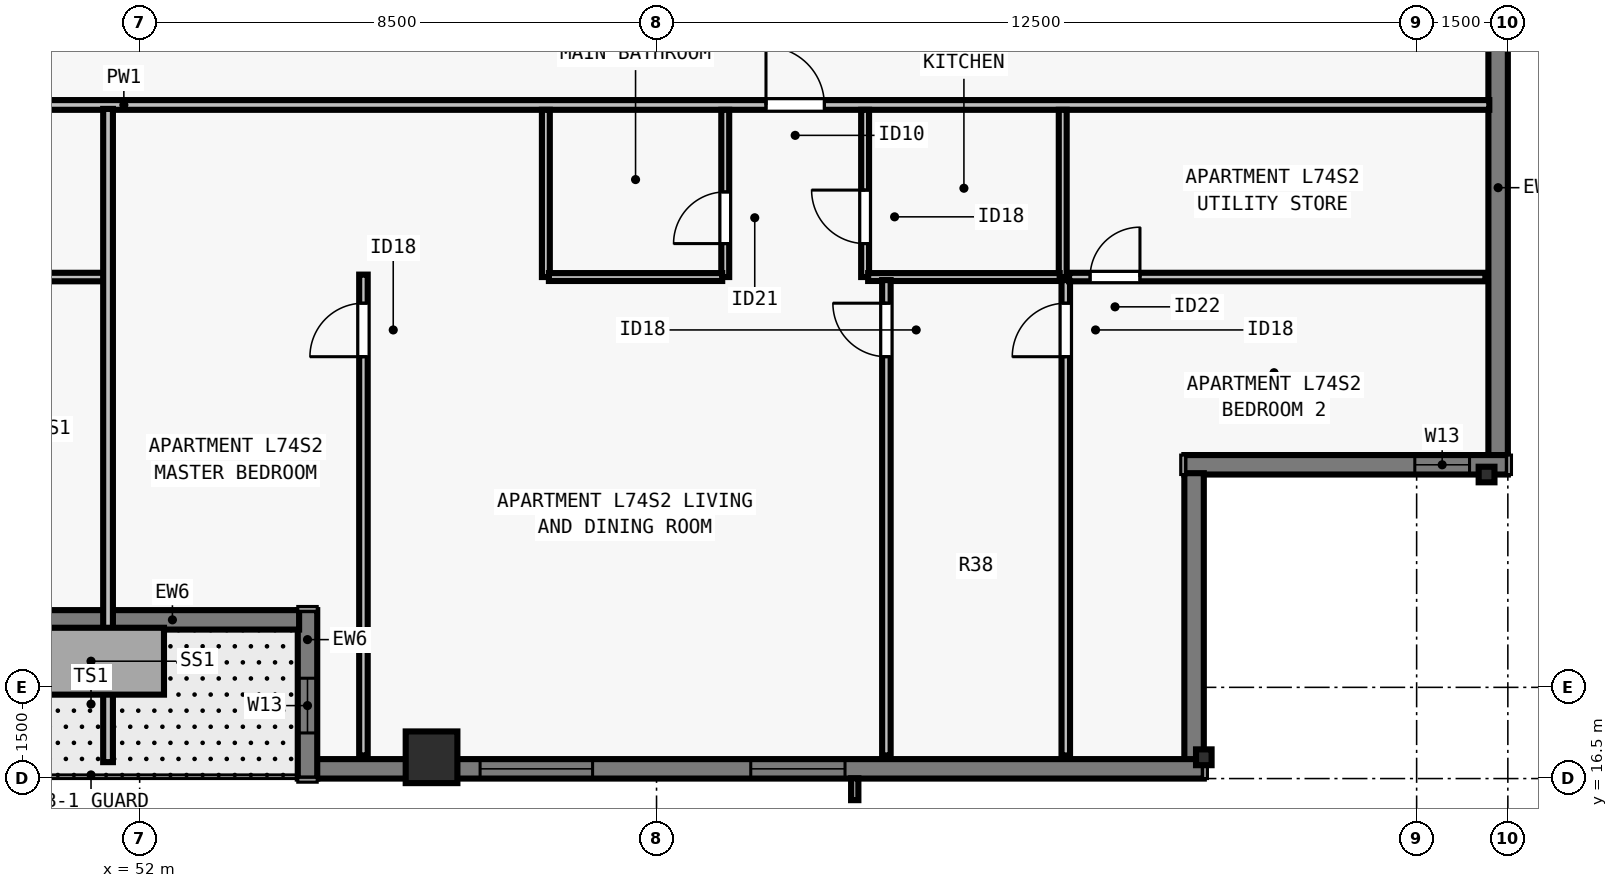
"""IFC4 building model, lengths in metres.
Left out: names, types, materials, properties, quantities, classifications, styles, units other than length and angle.
Written with IfcOpenShell. Run it as: python <this file> out.ifc"""

import sys

from ifc_helpers import new_model, si_unit, direction, frame, frame_2d, origin, origin_2d, place, context, subcontext, project, spatial, rectangle, i_section, extrude, element, fill, save


model = new_model("IFC4")
c1 = context("Model", 3, precision=1e-05, world=origin(), true_north=direction((0.0, 1.0)))
c2 = subcontext(c1, "Body", "Model", "MODEL_VIEW")
j1 = project(units=[si_unit("LENGTHUNIT", "METRE"), si_unit("PLANEANGLEUNIT", "RADIAN")], contexts=[c1])
p1 = place(None, origin())
s1 = spatial("IfcSite", under=j1, at=p1, CompositionType="ELEMENT")
p2 = place(p1, origin())
s2 = spatial("IfcBuilding", under=s1, at=p2, CompositionType="ELEMENT")
p3 = place(p2, frame((0.0, 0.0, 269.0)))
s3 = spatial("IfcBuildingStorey", under=s2, at=p3, CompositionType="ELEMENT", Elevation=269.0)
p4 = place(p3, frame((56.8, 16.85, 0.0), z_axis=(0.0, 0.0, 1.0), x_axis=(1.0, 0.0, 0.0)))
e1 = element("IfcColumn", 1, at=p4, inside=s3, PredefinedType="COLUMN", context=c2, shape_type="SweptSolid", body=[
    extrude(rectangle(XDim=0.85, YDim=0.85, at=origin_2d()), origin(), (0.0, 0.0, 1.0), 3.5),
])
for number, where, z_axis, x_axis in (
    (2, (69.5, 16.85, 0.0), (0.0, 0.0, 1.0), (1.0, 0.0, 0.0)),
    (3, (74.15, 21.5, 0.0), (0.0, 0.0, 1.0), (0.0, 1.0, 0.0)),
):
    element("IfcColumn", number, at=place(p3, frame(where, z_axis=z_axis, x_axis=x_axis)), inside=s3, PredefinedType="COLUMN", context=c2, shape_type="SweptSolid", body=[
        extrude(i_section(OverallWidth=0.256, OverallDepth=0.26, WebThickness=0.01, FlangeThickness=0.017, FilletRadius=0.013, at=origin_2d()), origin(), (0.0, 0.0, 1.0), 3.5),
    ])
p5 = place(p3, frame((74.34, 56.5, 0.0), z_axis=(0.0, 0.0, 1.0), x_axis=(0.0, -1.0, 0.0)))
e4 = element("IfcWall", 4, at=p5, inside=s3, PredefinedType="SOLIDWALL", context=c2, shape_type="SweptSolid", body=[
    extrude(rectangle(XDim=34.702, YDim=0.32, at=frame_2d((17.351, 0.0))), origin(), (0.0, 0.0, 1.0), 3.29),
])
p6 = place(p5, frame((6.738, 0.0, 0.8)))
e5 = element("IfcOpeningElement", 5, at=p6, cuts=e4, PredefinedType="OPENING", context=c2, shape_type="SweptSolid", body=[
    extrude(rectangle(XDim=1.85, YDim=1.678, at=frame_2d((0.925, 0.839))), frame((0.0, 0.17, 0.0), z_axis=(0.0, -1.0, 0.0), x_axis=(1.0, 0.0, 0.0)), (0.0, 0.0, 1.0), 0.34),
])
p7 = place(p5, frame((10.263, 0.0, 0.8)))
e6 = element("IfcOpeningElement", 6, at=p7, cuts=e4, PredefinedType="OPENING", context=c2, shape_type="SweptSolid", body=[
    extrude(rectangle(XDim=1.55, YDim=1.678, at=frame_2d((0.775, 0.839))), frame((0.0, 0.17, 0.0), z_axis=(0.0, -1.0, 0.0), x_axis=(1.0, 0.0, 0.0)), (0.0, 0.0, 1.0), 0.34),
])
p8 = place(p5, frame((13.488, 0.0, 0.8)))
e7 = element("IfcOpeningElement", 7, at=p8, cuts=e4, PredefinedType="OPENING", context=c2, shape_type="SweptSolid", body=[
    extrude(rectangle(XDim=1.85, YDim=1.678, at=frame_2d((0.925, 0.839))), frame((0.0, 0.17, 0.0), z_axis=(0.0, -1.0, 0.0), x_axis=(1.0, 0.0, 0.0)), (0.0, 0.0, 1.0), 0.34),
])
p9 = place(p5, frame((18.264, 0.0, 0.8)))
e8 = element("IfcOpeningElement", 8, at=p9, cuts=e4, PredefinedType="OPENING", context=c2, shape_type="SweptSolid", body=[
    extrude(rectangle(XDim=1.55, YDim=1.678, at=frame_2d((0.775, 0.839))), frame((0.0, 0.17, 0.0), z_axis=(0.0, -1.0, 0.0), x_axis=(1.0, 0.0, 0.0)), (0.0, 0.0, 1.0), 0.34),
])
p10 = place(p5, frame((24.164, 0.0, 0.8)))
e9 = element("IfcOpeningElement", 9, at=p10, cuts=e4, PredefinedType="OPENING", context=c2, shape_type="SweptSolid", body=[
    extrude(rectangle(XDim=1.55, YDim=1.678, at=frame_2d((0.775, 0.839))), frame((0.0, 0.17, 0.0), z_axis=(0.0, -1.0, 0.0), x_axis=(1.0, 0.0, 0.0)), (0.0, 0.0, 1.0), 0.34),
])
p11 = place(p3, frame((74.5, 21.66, 0.0), z_axis=(0.0, 0.0, 1.0), x_axis=(-1.0, 0.0, 0.0)))
e10 = element("IfcWall", 10, at=p11, inside=s3, PredefinedType="SOLIDWALL", context=c2, shape_type="SweptSolid", body=[
    extrude(rectangle(XDim=5.32, YDim=0.32, at=frame_2d((2.66, 0.0))), origin(), (0.0, 0.0, 1.0), 3.29),
])
p12 = place(p11, frame((0.63, 0.0, 0.8)))
e11 = element("IfcOpeningElement", 11, at=p12, cuts=e10, PredefinedType="OPENING", context=c2, shape_type="SweptSolid", body=[
    extrude(rectangle(XDim=0.9, YDim=1.678, at=frame_2d((0.45, 0.839))), frame((0.0, 0.17, 0.0), z_axis=(0.0, -1.0, 0.0), x_axis=(1.0, 0.0, 0.0)), (0.0, 0.0, 1.0), 0.34),
])
p13 = place(p3, frame((69.34, 21.522, 0.0), z_axis=(0.0, 0.0, 1.0), x_axis=(0.0, -1.0, 0.0)))
e12 = element("IfcWall", 12, at=p13, inside=s3, PredefinedType="SOLIDWALL", context=c2, shape_type="SweptSolid", body=[
    extrude(rectangle(XDim=4.724, YDim=0.32, at=frame_2d((2.362, 0.0))), origin(), (0.0, 0.0, 1.0), 3.29),
])
p14 = place(p3, frame((69.5, 16.66, 0.0), z_axis=(0.0, 0.0, 1.0), x_axis=(-1.0, 0.0, 0.0)))
e13 = element("IfcWall", 13, at=p14, inside=s3, PredefinedType="SOLIDWALL", context=c2, shape_type="SweptSolid", body=[
    extrude(rectangle(XDim=14.602, YDim=0.32, at=frame_2d((7.301, 0.0))), origin(), (0.0, 0.0, 1.0), 3.29),
])
p15 = place(p14, frame((5.9, 0.0, 0.8)))
e14 = element("IfcOpeningElement", 14, at=p15, cuts=e13, PredefinedType="OPENING", context=c2, shape_type="SweptSolid", body=[
    extrude(rectangle(XDim=1.55, YDim=1.678, at=frame_2d((0.775, 0.839))), frame((0.0, 0.17, 0.0), z_axis=(0.0, -1.0, 0.0), x_axis=(1.0, 0.0, 0.0)), (0.0, 0.0, 1.0), 0.34),
])
p16 = place(p14, frame((10.052, 0.0, 0.8)))
e15 = element("IfcOpeningElement", 15, at=p16, cuts=e13, PredefinedType="OPENING", context=c2, shape_type="SweptSolid", body=[
    extrude(rectangle(XDim=1.85, YDim=1.678, at=frame_2d((0.925, 0.839))), frame((0.0, 0.17, 0.0), z_axis=(0.0, -1.0, 0.0), x_axis=(1.0, 0.0, 0.0)), (0.0, 0.0, 1.0), 0.34),
])
p17 = place(p3, frame((54.76, 16.5, 0.0), z_axis=(0.0, 0.0, 1.0), x_axis=(0.0, 1.0, 0.0)))
e16 = element("IfcWall", 16, at=p17, inside=s3, PredefinedType="SOLIDWALL", context=c2, shape_type="SweptSolid", body=[
    extrude(rectangle(XDim=2.77, YDim=0.32, at=frame_2d((1.385, 0.0))), origin(), (0.0, 0.0, 1.0), 3.29),
])
p18 = place(p17, frame((0.75, 0.0, 0.8)))
e17 = element("IfcOpeningElement", 17, at=p18, cuts=e16, PredefinedType="OPENING", context=c2, shape_type="SweptSolid", body=[
    extrude(rectangle(XDim=0.9, YDim=1.678, at=frame_2d((0.45, 0.839))), frame((0.0, 0.17, 0.0), z_axis=(0.0, -1.0, 0.0), x_axis=(1.0, 0.0, 0.0)), (0.0, 0.0, 1.0), 0.34),
])
p19 = place(p3, frame((54.622, 19.11, 0.0), z_axis=(0.0, 0.0, 1.0), x_axis=(-1.0, 0.0, 0.0)))
e18 = element("IfcWall", 18, at=p19, inside=s3, PredefinedType="SOLIDWALL", context=c2, shape_type="SweptSolid", body=[
    extrude(rectangle(XDim=7.142, YDim=0.32, at=frame_2d((3.571, 0.0))), origin(), (0.0, 0.0, 1.0), 3.29),
])
p20 = place(p19, frame((4.317, 0.0, 0.0)))
e19 = element("IfcOpeningElement", 19, at=p20, cuts=e18, PredefinedType="OPENING", context=c2, shape_type="SweptSolid", body=[
    extrude(rectangle(XDim=1.0, YDim=2.15, at=frame_2d((0.5, 1.075))), frame((0.0, 0.17, 0.0), z_axis=(0.0, -1.0, 0.0), x_axis=(1.0, 0.0, 0.0)), (0.0, 0.0, 1.0), 0.34),
])
p21 = place(p3, frame((29.805, 27.577, 0.0), z_axis=(0.0, 0.0, 1.0), x_axis=(1.0, 0.0, 0.0)))
e20 = element("IfcWall", 20, at=p21, inside=s3, PredefinedType="PARTITIONING", context=c2, shape_type="SweptSolid", body=[
    extrude(rectangle(XDim=44.39, YDim=0.16, at=frame_2d((22.195, 0.0))), origin(), (0.0, 0.0, 1.0), 2.958),
])
p22 = place(p21, frame((10.415, 0.0, 0.0)))
e21 = element("IfcOpeningElement", 21, at=p22, cuts=e20, PredefinedType="OPENING", context=c2, shape_type="SweptSolid", body=[
    extrude(rectangle(XDim=0.96, YDim=2.18, at=frame_2d((0.48, 1.09))), frame((0.0, 0.09, 0.0), z_axis=(0.0, -1.0, 0.0), x_axis=(1.0, 0.0, 0.0)), (0.0, 0.0, 1.0), 0.18),
])
p23 = place(p21, frame((32.495, 0.0, 0.0)))
e22 = element("IfcOpeningElement", 22, at=p23, cuts=e20, PredefinedType="OPENING", context=c2, shape_type="SweptSolid", body=[
    extrude(rectangle(XDim=0.96, YDim=2.18, at=frame_2d((0.48, 1.09))), frame((0.0, 0.09, 0.0), z_axis=(0.0, -1.0, 0.0), x_axis=(1.0, 0.0, 0.0)), (0.0, 0.0, 1.0), 0.18),
])
p24 = place(p3, frame((45.15, 24.748, 0.0), z_axis=(0.0, 0.0, 1.0), x_axis=(1.0, 0.0, 0.0)))
e23 = element("IfcWall", 23, at=p24, inside=s3, PredefinedType="PARTITIONING", context=c2, shape_type="SweptSolid", body=[
    extrude(rectangle(XDim=6.38, YDim=0.14, at=frame_2d((3.19, 0.0))), origin(), (0.0, 0.0, 1.0), 3.29),
])
p25 = place(p24, frame((0.4, 0.0, 0.0)))
e24 = element("IfcOpeningElement", 24, at=p25, cuts=e23, PredefinedType="OPENING", context=c2, shape_type="SweptSolid", body=[
    extrude(rectangle(XDim=0.82, YDim=2.1, at=frame_2d((0.41, 1.05))), frame((0.0, 0.08, 0.0), z_axis=(0.0, -1.0, 0.0), x_axis=(1.0, 0.0, 0.0)), (0.0, 0.0, 1.0), 0.16),
])
p26 = place(p3, frame((51.48, 16.77, 0.0), z_axis=(0.0, 0.0, 1.0), x_axis=(0.0, 1.0, 0.0)))
e25 = element("IfcWall", 25, at=p26, inside=s3, PredefinedType="PARTITIONING", context=c2, shape_type="SweptSolid", body=[
    extrude(rectangle(XDim=10.742, YDim=0.16, at=frame_2d((5.371, 0.0))), origin(), (0.0, 0.0, 1.0), 2.958),
])
p27 = place(p3, frame((58.68, 24.748, 0.0), z_axis=(0.0, 0.0, 1.0), x_axis=(0.0, 1.0, 0.0)))
e26 = element("IfcWall", 26, at=p27, inside=s3, PredefinedType="PLUMBINGWALL", context=c2, shape_type="SweptSolid", body=[
    extrude(rectangle(XDim=2.75, YDim=0.13, at=frame_2d((1.375, 0.0))), origin(), (0.0, 0.0, 1.0), 3.29),
])
p28 = place(p3, frame((61.63, 24.748, 0.0), z_axis=(0.0, 0.0, 1.0), x_axis=(0.0, 1.0, 0.0)))
e27 = element("IfcWall", 27, at=p28, inside=s3, PredefinedType="PLUMBINGWALL", context=c2, shape_type="SweptSolid", body=[
    extrude(rectangle(XDim=2.75, YDim=0.13, at=frame_2d((1.375, 0.0))), origin(), (0.0, 0.0, 1.0), 3.29),
])
p29 = place(p28, frame((0.55, 0.0, 0.0)))
e28 = element("IfcOpeningElement", 28, at=p29, cuts=e27, PredefinedType="OPENING", context=c2, shape_type="SweptSolid", body=[
    extrude(rectangle(XDim=0.85, YDim=2.08, at=frame_2d((0.425, 1.04))), frame((0.0, 0.075, 0.0), z_axis=(0.0, -1.0, 0.0), x_axis=(1.0, 0.0, 0.0)), (0.0, 0.0, 1.0), 0.15),
])
p30 = place(p3, frame((58.73, 24.748, 0.0), z_axis=(0.0, 0.0, 1.0), x_axis=(1.0, 0.0, 0.0)))
e29 = element("IfcWall", 29, at=p30, inside=s3, PredefinedType="PLUMBINGWALL", context=c2, shape_type="SweptSolid", body=[
    extrude(rectangle(XDim=2.85, YDim=0.13, at=frame_2d((1.425, 0.0))), origin(), (0.0, 0.0, 1.0), 3.29),
])
p31 = place(p3, frame((67.18, 24.748, 0.0), z_axis=(0.0, 0.0, 1.0), x_axis=(0.0, 1.0, 0.0)))
e30 = element("IfcWall", 30, at=p31, inside=s3, PredefinedType="PLUMBINGWALL", context=c2, shape_type="SweptSolid", body=[
    extrude(rectangle(XDim=2.75, YDim=0.13, at=frame_2d((1.375, 0.0))), origin(), (0.0, 0.0, 1.0), 3.29),
])
p32 = place(p3, frame((63.93, 24.748, 0.0), z_axis=(0.0, 0.0, 1.0), x_axis=(0.0, 1.0, 0.0)))
e31 = element("IfcWall", 31, at=p32, inside=s3, PredefinedType="PLUMBINGWALL", context=c2, shape_type="SweptSolid", body=[
    extrude(rectangle(XDim=2.75, YDim=0.13, at=frame_2d((1.375, 0.0))), origin(), (0.0, 0.0, 1.0), 2.573),
])
p33 = place(p32, frame((0.55, 0.0, 0.0)))
e32 = element("IfcOpeningElement", 32, at=p33, cuts=e31, PredefinedType="OPENING", context=c2, shape_type="SweptSolid", body=[
    extrude(rectangle(XDim=0.88, YDim=2.1, at=frame_2d((0.44, 1.05))), frame((0.0, 0.075, 0.0), z_axis=(0.0, -1.0, 0.0), x_axis=(1.0, 0.0, 0.0)), (0.0, 0.0, 1.0), 0.15),
])
p34 = place(p3, frame((63.98, 24.748, 0.0), z_axis=(0.0, 0.0, 1.0), x_axis=(1.0, 0.0, 0.0)))
e33 = element("IfcWall", 33, at=p34, inside=s3, PredefinedType="PLUMBINGWALL", context=c2, shape_type="SweptSolid", body=[
    extrude(rectangle(XDim=3.15, YDim=0.13, at=frame_2d((1.575, 0.0))), origin(), (0.0, 0.0, 1.0), 3.29),
])
p35 = place(p3, frame((55.68, 16.88, 0.0), z_axis=(0.0, 0.0, 1.0), x_axis=(0.0, 1.0, 0.0)))
e34 = element("IfcWall", 34, at=p35, inside=s3, PredefinedType="PARTITIONING", context=c2, shape_type="SweptSolid", body=[
    extrude(rectangle(XDim=7.908, YDim=0.14, at=frame_2d((3.954, 0.0))), origin(), (0.0, 0.0, 1.0), 3.29),
])
p36 = place(p35, frame((6.558, 0.0, 0.0)))
e35 = element("IfcOpeningElement", 35, at=p36, cuts=e34, PredefinedType="OPENING", context=c2, shape_type="SweptSolid", body=[
    extrude(rectangle(XDim=0.88, YDim=2.1, at=frame_2d((0.44, 1.05))), frame((0.0, 0.08, 0.0), z_axis=(0.0, -1.0, 0.0), x_axis=(1.0, 0.0, 0.0)), (0.0, 0.0, 1.0), 0.16),
])
p37 = place(p3, frame((67.23, 16.88, 0.0), z_axis=(0.0, 0.0, 1.0), x_axis=(0.0, 1.0, 0.0)))
e36 = element("IfcWall", 36, at=p37, inside=s3, PredefinedType="PARTITIONING", context=c2, shape_type="SweptSolid", body=[
    extrude(rectangle(XDim=7.818, YDim=0.14, at=frame_2d((3.909, 0.0))), origin(), (0.0, 0.0, 1.0), 2.573),
])
p38 = place(p37, frame((6.558, 0.0, 0.0)))
e37 = element("IfcOpeningElement", 37, at=p38, cuts=e36, PredefinedType="OPENING", context=c2, shape_type="SweptSolid", body=[
    extrude(rectangle(XDim=0.88, YDim=2.1, at=frame_2d((0.44, 1.05))), frame((0.0, 0.08, 0.0), z_axis=(0.0, -1.0, 0.0), x_axis=(1.0, 0.0, 0.0)), (0.0, 0.0, 1.0), 0.16),
])
p39 = place(p3, frame((67.285, 24.748, 0.0), z_axis=(0.0, 0.0, 1.0), x_axis=(1.0, 0.0, 0.0)))
e38 = element("IfcWall", 38, at=p39, inside=s3, PredefinedType="PARTITIONING", context=c2, shape_type="SweptSolid", body=[
    extrude(rectangle(XDim=6.845, YDim=0.14, at=frame_2d((3.422, 0.0))), origin(), (0.0, 0.0, 1.0), 2.958),
])
p40 = place(p39, frame((0.345, 0.0, 0.0)))
e39 = element("IfcOpeningElement", 39, at=p40, cuts=e38, PredefinedType="OPENING", context=c2, shape_type="SweptSolid", body=[
    extrude(rectangle(XDim=0.82, YDim=2.1, at=frame_2d((0.41, 1.05))), frame((0.0, 0.08, 0.0), z_axis=(0.0, -1.0, 0.0), x_axis=(1.0, 0.0, 0.0)), (0.0, 0.0, 1.0), 0.16),
])
p41 = place(p3, frame((64.28, 16.88, 0.0), z_axis=(0.0, 0.0, 1.0), x_axis=(0.0, 1.0, 0.0)))
e40 = element("IfcWall", 40, at=p41, inside=s3, PredefinedType="PARTITIONING", context=c2, shape_type="SweptSolid", body=[
    extrude(rectangle(XDim=7.818, YDim=0.14, at=frame_2d((3.909, 0.0))), origin(), (0.0, 0.0, 1.0), 2.573),
])
p42 = place(p41, frame((6.558, 0.0, 0.0)))
e41 = element("IfcOpeningElement", 41, at=p42, cuts=e40, PredefinedType="OPENING", context=c2, shape_type="SweptSolid", body=[
    extrude(rectangle(XDim=0.88, YDim=2.1, at=frame_2d((0.44, 1.05))), frame((0.0, 0.08, 0.0), z_axis=(0.0, -1.0, 0.0), x_axis=(1.0, 0.0, 0.0)), (0.0, 0.0, 1.0), 0.16),
])
p43 = place(p15, origin())
e42 = element("IfcWindow", 42, at=p43, inside=s3, PartitioningType="SINGLE_PANEL", PredefinedType="WINDOW", context=c2, shape_type="SweptSolid", body=[
    extrude(rectangle(XDim=1.55, YDim=1.678, at=frame_2d((0.775, 0.839))), frame((0.0, -0.05, 0.0), z_axis=(0.0, -1.0, 0.0), x_axis=(1.0, 0.0, 0.0)), (0.0, 0.0, 1.0), 0.06),
])
fill(e14, e42)
p44 = place(p16, origin())
e43 = element("IfcWindow", 43, at=p44, inside=s3, PartitioningType="SINGLE_PANEL", PredefinedType="WINDOW", context=c2, shape_type="SweptSolid", body=[
    extrude(rectangle(XDim=1.85, YDim=1.678, at=frame_2d((0.925, 0.839))), frame((0.0, -0.05, 0.0), z_axis=(0.0, -1.0, 0.0), x_axis=(1.0, 0.0, 0.0)), (0.0, 0.0, 1.0), 0.06),
])
fill(e15, e43)
p45 = place(p18, origin())
e44 = element("IfcWindow", 44, at=p45, inside=s3, PartitioningType="SINGLE_PANEL", PredefinedType="WINDOW", context=c2, shape_type="SweptSolid", body=[
    extrude(rectangle(XDim=0.9, YDim=1.678, at=frame_2d((0.45, 0.839))), frame((0.0, -0.04, 0.0), z_axis=(0.0, -1.0, 0.0), x_axis=(1.0, 0.0, 0.0)), (0.0, 0.0, 1.0), 0.06),
])
fill(e17, e44)
p46 = place(p12, origin())
e45 = element("IfcWindow", 45, at=p46, inside=s3, PartitioningType="SINGLE_PANEL", PredefinedType="WINDOW", context=c2, shape_type="SweptSolid", body=[
    extrude(rectangle(XDim=0.9, YDim=1.678, at=frame_2d((0.45, 0.839))), frame((0.0, -0.04, 0.0), z_axis=(0.0, -1.0, 0.0), x_axis=(1.0, 0.0, 0.0)), (0.0, 0.0, 1.0), 0.06),
])
fill(e11, e45)
p47 = place(p29, origin())
e46 = element("IfcDoor", 46, at=p47, inside=s3, OperationType="SINGLE_SWING_LEFT", PredefinedType="DOOR", context=c2, shape_type="SweptSolid", body=[
    extrude(rectangle(XDim=0.85, YDim=2.08, at=frame_2d((0.425, 1.04))), frame((0.0, 0.025, 0.0), z_axis=(0.0, -1.0, 0.0), x_axis=(1.0, 0.0, 0.0)), (0.0, 0.0, 1.0), 0.05),
])
fill(e28, e46)
p48 = place(p33, origin())
e47 = element("IfcDoor", 47, at=p48, inside=s3, OperationType="SINGLE_SWING_RIGHT", PredefinedType="DOOR", context=c2, shape_type="SweptSolid", body=[
    extrude(rectangle(XDim=0.88, YDim=2.1, at=frame_2d((0.44, 1.05))), frame((0.0, 0.025, 0.0), z_axis=(0.0, -1.0, 0.0), x_axis=(1.0, 0.0, 0.0)), (0.0, 0.0, 1.0), 0.05),
])
fill(e32, e47)
p49 = place(p36, origin())
e48 = element("IfcDoor", 48, at=p49, inside=s3, OperationType="SINGLE_SWING_LEFT", PredefinedType="DOOR", context=c2, shape_type="SweptSolid", body=[
    extrude(rectangle(XDim=0.88, YDim=2.1, at=frame_2d((0.44, 1.05))), frame((0.0, 0.025, 0.0), z_axis=(0.0, -1.0, 0.0), x_axis=(1.0, 0.0, 0.0)), (0.0, 0.0, 1.0), 0.05),
])
fill(e35, e48)
p50 = place(p40, origin())
e49 = element("IfcDoor", 49, at=p50, inside=s3, OperationType="SINGLE_SWING_RIGHT", PredefinedType="DOOR", context=c2, shape_type="SweptSolid", body=[
    extrude(rectangle(XDim=0.82, YDim=2.1, at=frame_2d((0.41, 1.05))), frame((0.0, 0.025, 0.0), z_axis=(0.0, -1.0, 0.0), x_axis=(1.0, 0.0, 0.0)), (0.0, 0.0, 1.0), 0.05),
])
fill(e39, e49)
p51 = place(p38, origin())
e50 = element("IfcDoor", 50, at=p51, inside=s3, OperationType="SINGLE_SWING_LEFT", PredefinedType="DOOR", context=c2, shape_type="SweptSolid", body=[
    extrude(rectangle(XDim=0.88, YDim=2.1, at=frame_2d((0.44, 1.05))), frame((0.0, 0.025, 0.0), z_axis=(0.0, -1.0, 0.0), x_axis=(1.0, 0.0, 0.0)), (0.0, 0.0, 1.0), 0.05),
])
fill(e37, e50)
p52 = place(p42, origin())
e51 = element("IfcDoor", 51, at=p52, inside=s3, OperationType="SINGLE_SWING_RIGHT", PredefinedType="DOOR", context=c2, shape_type="SweptSolid", body=[
    extrude(rectangle(XDim=0.88, YDim=2.1, at=frame_2d((0.44, 1.05))), frame((0.0, 0.025, 0.0), z_axis=(0.0, -1.0, 0.0), x_axis=(1.0, 0.0, 0.0)), (0.0, 0.0, 1.0), 0.05),
])
fill(e41, e51)
p53 = place(p23, origin())
e52 = element("IfcDoor", 52, at=p53, inside=s3, OperationType="SINGLE_SWING_LEFT", PredefinedType="DOOR", context=c2, shape_type="SweptSolid", body=[
    extrude(rectangle(XDim=0.96, YDim=2.18, at=frame_2d((0.48, 1.09))), frame((0.0, 0.025, 0.0), z_axis=(0.0, -1.0, 0.0), x_axis=(1.0, 0.0, 0.0)), (0.0, 0.0, 1.0), 0.05),
])
fill(e22, e52)
save(model, sys.argv[1])
